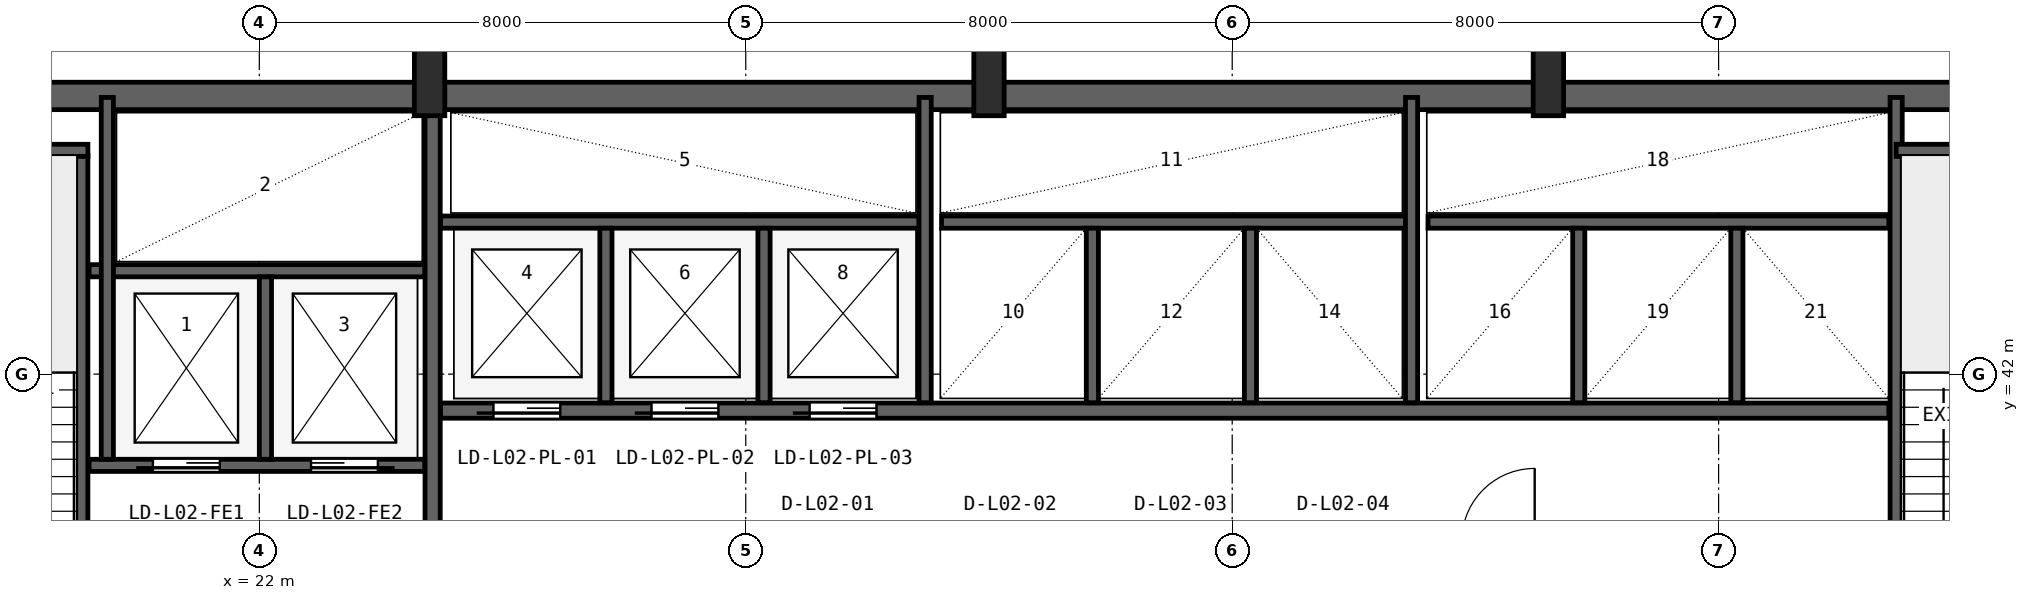
"""IFC4 building model, lengths in metres.
Left out: names, types, materials, properties, quantities, classifications, styles, units other than length and angle.
Written with IfcOpenShell. Run it as: python <this file> out.ifc"""

import sys

from ifc_helpers import new_model, si_unit, direction, frame, frame_2d, origin, origin_2d, place, context, subcontext, project, spatial, rectangle, i_section, extrude, source, transform, mapped, element, fill, save


model = new_model("IFC4")
c1 = context("Model", 3, precision=1e-05, world=origin(), true_north=direction((0.0, 1.0)))
c2 = subcontext(c1, "Body", "Model", "MODEL_VIEW")
j1 = project(units=[si_unit("LENGTHUNIT", "METRE"), si_unit("PLANEANGLEUNIT", "RADIAN")], contexts=[c1])
p1 = place(None, origin())
s1 = spatial("IfcSite", under=j1, at=p1, CompositionType="ELEMENT")
p2 = place(p1, origin())
s2 = spatial("IfcBuilding", under=s1, at=p2, CompositionType="ELEMENT")
p3 = place(p2, frame((0.0, 0.0, 11.4)))
s3 = spatial("IfcBuildingStorey", under=s2, at=p3, CompositionType="ELEMENT", Elevation=11.4)
p4 = place(p3, frame((15.6, 46.575, 0.0), z_axis=(0.0, 0.0, 1.0), x_axis=(1.0, 0.0, 0.0)))
e1 = element("IfcWall", 1, at=p4, inside=s3, PredefinedType="SHEAR", context=c2, shape_type="SweptSolid", body=[
    extrude(rectangle(XDim=36.8, YDim=0.45, at=frame_2d((18.4, 0.0))), origin(), (0.0, 0.0, 1.0), 5.12),
])
m1 = source(origin(), c2, "Body", "SweptSolid", [
    extrude(i_section(OverallWidth=0.5, OverallDepth=1.1, WebThickness=0.018, FlangeThickness=0.032, FilletRadius=0.018, at=origin_2d()), origin(), (0.0, 0.0, 1.0), 5.4),
])
for number, where, z_axis, x_axis in (
    (2, (24.8, 46.8, 0.0), (0.0, 0.0, 1.0), (1.0, 0.0, 0.0)),
    (3, (34.0, 46.8, 0.0), (0.0, 0.0, 1.0), (1.0, 0.0, 0.0)),
    (4, (43.2, 46.8, 0.0), (0.0, 0.0, 1.0), (1.0, 0.0, 0.0)),
):
    element("IfcColumn", number, at=place(p3, frame(where, z_axis=z_axis, x_axis=x_axis)), inside=s3, PredefinedType="COLUMN", context=c2, shape_type="MappedRepresentation", body=[
        mapped(m1, transform((0.0, 0.0, 0.0), x_axis=(1.0, 0.0, 0.0), y_axis=(0.0, 1.0, 0.0), z_axis=(0.0, 0.0, 1.0), scale=1.0)),
    ])
p5 = place(p3, frame((19.08, 35.95, 0.0), z_axis=(0.0, 0.0, 1.0), x_axis=(0.0, 1.0, 0.0)))
e5 = element("IfcWall", 5, at=p5, inside=s3, PredefinedType="SHEAR", context=c2, shape_type="SweptSolid", body=[
    extrude(rectangle(XDim=9.65, YDim=0.2, at=frame_2d((4.825, 0.0))), origin(), (0.0, 0.0, 1.0), 5.12),
])
p6 = place(p5, frame((0.25, 0.0, 0.0)))
e6 = element("IfcOpeningElement", 6, at=p6, cuts=e5, PredefinedType="OPENING", context=c2, shape_type="SweptSolid", body=[
    extrude(rectangle(XDim=0.95, YDim=2.1, at=frame_2d((0.475, 1.05))), frame((0.0, 0.11, 0.0), z_axis=(0.0, -1.0, 0.0), x_axis=(1.0, 0.0, 0.0)), (0.0, 0.0, 1.0), 0.22),
])
p7 = place(p3, frame((15.95, 45.68, 0.0), z_axis=(0.0, 0.0, 1.0), x_axis=(1.0, 0.0, 0.0)))
e7 = element("IfcWall", 7, at=p7, inside=s3, PredefinedType="SHEAR", context=c2, shape_type="SweptSolid", body=[
    extrude(rectangle(XDim=3.23, YDim=0.2, at=frame_2d((1.615, 0.0))), origin(), (0.0, 0.0, 1.0), 5.12),
])
p8 = place(p3, frame((24.85, 36.05, 0.0), z_axis=(0.0, 0.0, 1.0), x_axis=(0.0, 1.0, 0.0)))
e8 = element("IfcWall", 8, at=p8, inside=s3, PredefinedType="SHEAR", context=c2, shape_type="SweptSolid", body=[
    extrude(rectangle(XDim=10.45, YDim=0.25, at=frame_2d((5.225, 0.0))), origin(), (0.0, 0.0, 1.0), 5.12),
])
p9 = place(p3, frame((19.2, 40.5, 0.0), z_axis=(0.0, 0.0, 1.0), x_axis=(1.0, 0.0, 0.0)))
e9 = element("IfcWall", 9, at=p9, inside=s3, PredefinedType="SHEAR", context=c2, shape_type="SweptSolid", body=[
    extrude(rectangle(XDim=5.52, YDim=0.2, at=frame_2d((2.76, 0.0))), origin(), (0.0, 0.0, 1.0), 5.12),
])
p10 = place(p9, frame((1.05, 0.0, 0.0)))
e10 = element("IfcOpeningElement", 10, at=p10, cuts=e9, PredefinedType="OPENING", context=c2, shape_type="SweptSolid", body=[
    extrude(rectangle(XDim=1.1, YDim=2.18, at=frame_2d((0.55, 1.09))), frame((0.0, 0.11, 0.0), z_axis=(0.0, -1.0, 0.0), x_axis=(1.0, 0.0, 0.0)), (0.0, 0.0, 1.0), 0.22),
])
p11 = place(p9, frame((3.65, 0.0, 0.0)))
e11 = element("IfcOpeningElement", 11, at=p11, cuts=e9, PredefinedType="OPENING", context=c2, shape_type="SweptSolid", body=[
    extrude(rectangle(XDim=1.1, YDim=2.18, at=frame_2d((0.55, 1.09))), frame((0.0, 0.11, 0.0), z_axis=(0.0, -1.0, 0.0), x_axis=(1.0, 0.0, 0.0)), (0.0, 0.0, 1.0), 0.22),
])
p12 = place(p3, frame((19.2, 43.7, 0.0), z_axis=(0.0, 0.0, 1.0), x_axis=(1.0, 0.0, 0.0)))
e12 = element("IfcWall", 12, at=p12, inside=s3, PredefinedType="SHEAR", context=c2, shape_type="SweptSolid", body=[
    extrude(rectangle(XDim=5.52, YDim=0.2, at=frame_2d((2.76, 0.0))), origin(), (0.0, 0.0, 1.0), 5.12),
])
p13 = place(p3, frame((22.1, 40.6, 0.0), z_axis=(0.0, 0.0, 1.0), x_axis=(0.0, 1.0, 0.0)))
e13 = element("IfcWall", 13, at=p13, inside=s3, PredefinedType="SHEAR", context=c2, shape_type="SweptSolid", body=[
    extrude(rectangle(XDim=3.0, YDim=0.2, at=frame_2d((1.5, 0.0))), origin(), (0.0, 0.0, 1.0), 5.12),
])
p14 = place(p3, frame((19.5, 40.6, 0.0), z_axis=(0.0, 0.0, 1.0), x_axis=(0.0, 1.0, 0.0)))
e14 = element("IfcWall", 14, at=p14, inside=s3, PredefinedType="SHEAR", context=c2, shape_type="SweptSolid", body=[
    extrude(rectangle(XDim=5.95, YDim=0.2, at=frame_2d((2.975, 0.0))), origin(), (0.0, 0.0, 1.0), 5.12),
])
p15 = place(p3, frame((48.92, 36.05, 0.0), z_axis=(0.0, 0.0, 1.0), x_axis=(0.0, 1.0, 0.0)))
e15 = element("IfcWall", 15, at=p15, inside=s3, PredefinedType="SHEAR", context=c2, shape_type="SweptSolid", body=[
    extrude(rectangle(XDim=10.5, YDim=0.2, at=frame_2d((5.25, 0.0))), origin(), (0.0, 0.0, 1.0), 5.12),
])
p16 = place(p3, frame((48.92, 45.68, 0.0), z_axis=(0.0, 0.0, 1.0), x_axis=(1.0, 0.0, 0.0)))
e16 = element("IfcWall", 16, at=p16, inside=s3, PredefinedType="SHEAR", context=c2, shape_type="SweptSolid", body=[
    extrude(rectangle(XDim=3.18, YDim=0.2, at=frame_2d((1.59, 0.0))), origin(), (0.0, 0.0, 1.0), 5.12),
])
p17 = place(p3, frame((24.98, 41.4, 0.0), z_axis=(0.0, 0.0, 1.0), x_axis=(1.0, 0.0, 0.0)))
e17 = element("IfcWall", 17, at=p17, inside=s3, PredefinedType="SHEAR", context=c2, shape_type="SweptSolid", body=[
    extrude(rectangle(XDim=23.82, YDim=0.25, at=frame_2d((11.91, 0.0))), origin(), (0.0, 0.0, 1.0), 5.12),
])
p18 = place(p17, frame((0.87, 0.0, 0.0)))
e18 = element("IfcOpeningElement", 18, at=p18, cuts=e17, PredefinedType="OPENING", context=c2, shape_type="SweptSolid", body=[
    extrude(rectangle(XDim=1.1, YDim=2.18, at=frame_2d((0.55, 1.09))), frame((0.0, 0.135, 0.0), z_axis=(0.0, -1.0, 0.0), x_axis=(1.0, 0.0, 0.0)), (0.0, 0.0, 1.0), 0.27),
])
p19 = place(p17, frame((3.47, 0.0, 0.0)))
e19 = element("IfcOpeningElement", 19, at=p19, cuts=e17, PredefinedType="OPENING", context=c2, shape_type="SweptSolid", body=[
    extrude(rectangle(XDim=1.1, YDim=2.18, at=frame_2d((0.55, 1.09))), frame((0.0, 0.135, 0.0), z_axis=(0.0, -1.0, 0.0), x_axis=(1.0, 0.0, 0.0)), (0.0, 0.0, 1.0), 0.27),
])
p20 = place(p17, frame((6.07, 0.0, 0.0)))
e20 = element("IfcOpeningElement", 20, at=p20, cuts=e17, PredefinedType="OPENING", context=c2, shape_type="SweptSolid", body=[
    extrude(rectangle(XDim=1.1, YDim=2.18, at=frame_2d((0.55, 1.09))), frame((0.0, 0.135, 0.0), z_axis=(0.0, -1.0, 0.0), x_axis=(1.0, 0.0, 0.0)), (0.0, 0.0, 1.0), 0.27),
])
p21 = place(p3, frame((24.98, 44.5, 0.0), z_axis=(0.0, 0.0, 1.0), x_axis=(1.0, 0.0, 0.0)))
e21 = element("IfcWall", 21, at=p21, inside=s3, PredefinedType="SHEAR", context=c2, shape_type="SweptSolid", body=[
    extrude(rectangle(XDim=7.87, YDim=0.2, at=frame_2d((3.935, 0.0))), origin(), (0.0, 0.0, 1.0), 5.12),
])
for number, where, z_axis, x_axis in (
    (22, (27.7, 41.53, 0.0), (0.0, 0.0, 1.0), (0.0, 1.0, 0.0)),
    (23, (30.3, 41.53, 0.0), (0.0, 0.0, 1.0), (0.0, 1.0, 0.0)),
):
    element("IfcWall", number, at=place(p3, frame(where, z_axis=z_axis, x_axis=x_axis)), inside=s3, PredefinedType="SHEAR", context=c2, shape_type="SweptSolid", body=[
        extrude(rectangle(XDim=2.87, YDim=0.2, at=frame_2d((1.435, 0.0))), origin(), (0.0, 0.0, 1.0), 5.12),
    ])
p22 = place(p3, frame((32.95, 41.53, 0.0), z_axis=(0.0, 0.0, 1.0), x_axis=(0.0, 1.0, 0.0)))
e24 = element("IfcWall", 24, at=p22, inside=s3, PredefinedType="SHEAR", context=c2, shape_type="SweptSolid", body=[
    extrude(rectangle(XDim=5.02, YDim=0.2, at=frame_2d((2.51, 0.0))), origin(), (0.0, 0.0, 1.0), 5.12),
])
p23 = place(p3, frame((33.22, 44.5, 0.0), z_axis=(0.0, 0.0, 1.0), x_axis=(1.0, 0.0, 0.0)))
e25 = element("IfcWall", 25, at=p23, inside=s3, PredefinedType="SHEAR", context=c2, shape_type="SweptSolid", body=[
    extrude(rectangle(XDim=7.63, YDim=0.2, at=frame_2d((3.815, 0.0))), origin(), (0.0, 0.0, 1.0), 5.12),
])
for number, where, z_axis, x_axis in (
    (26, (35.7, 41.53, 0.0), (0.0, 0.0, 1.0), (0.0, 1.0, 0.0)),
    (27, (38.3, 41.53, 0.0), (0.0, 0.0, 1.0), (0.0, 1.0, 0.0)),
):
    element("IfcWall", number, at=place(p3, frame(where, z_axis=z_axis, x_axis=x_axis)), inside=s3, PredefinedType="SHEAR", context=c2, shape_type="SweptSolid", body=[
        extrude(rectangle(XDim=2.87, YDim=0.2, at=frame_2d((1.435, 0.0))), origin(), (0.0, 0.0, 1.0), 5.12),
    ])
p24 = place(p3, frame((40.95, 41.53, 0.0), z_axis=(0.0, 0.0, 1.0), x_axis=(0.0, 1.0, 0.0)))
e28 = element("IfcWall", 28, at=p24, inside=s3, PredefinedType="SHEAR", context=c2, shape_type="SweptSolid", body=[
    extrude(rectangle(XDim=5.02, YDim=0.2, at=frame_2d((2.51, 0.0))), origin(), (0.0, 0.0, 1.0), 5.12),
])
p25 = place(p3, frame((41.22, 44.5, 0.0), z_axis=(0.0, 0.0, 1.0), x_axis=(1.0, 0.0, 0.0)))
e29 = element("IfcWall", 29, at=p25, inside=s3, PredefinedType="SHEAR", context=c2, shape_type="SweptSolid", body=[
    extrude(rectangle(XDim=7.58, YDim=0.2, at=frame_2d((3.79, 0.0))), origin(), (0.0, 0.0, 1.0), 5.12),
])
for number, where, z_axis, x_axis in (
    (30, (43.7, 41.53, 0.0), (0.0, 0.0, 1.0), (0.0, 1.0, 0.0)),
    (31, (46.3, 41.53, 0.0), (0.0, 0.0, 1.0), (0.0, 1.0, 0.0)),
):
    element("IfcWall", number, at=place(p3, frame(where, z_axis=z_axis, x_axis=x_axis)), inside=s3, PredefinedType="SHEAR", context=c2, shape_type="SweptSolid", body=[
        extrude(rectangle(XDim=2.87, YDim=0.2, at=frame_2d((1.435, 0.0))), origin(), (0.0, 0.0, 1.0), 5.12),
    ])
m2 = source(origin(), c2, "Body", "SweptSolid", [
    extrude(rectangle(XDim=1.1, YDim=2.18, at=frame_2d((0.55, 1.09))), frame((0.0, 0.025, 0.0), z_axis=(0.0, -1.0, 0.0), x_axis=(1.0, 0.0, 0.0)), (0.0, 0.0, 1.0), 0.05),
])
p26 = place(p10, frame((1.1, 0.0, 0.0), z_axis=(0.0, 0.0, 1.0), x_axis=(-1.0, 0.0, 0.0)))
e32 = element("IfcDoor", 32, at=p26, inside=s3, OperationType="SLIDING_TO_LEFT", PredefinedType="DOOR", context=c2, shape_type="MappedRepresentation", body=[
    mapped(m2, transform((0.0, 0.0, 0.0), x_axis=(1.0, 0.0, 0.0), y_axis=(0.0, 1.0, 0.0), z_axis=(0.0, 0.0, 1.0), scale=1.0)),
])
fill(e10, e32)
p27 = place(p11, frame((1.1, 0.0, 0.0), z_axis=(0.0, 0.0, 1.0), x_axis=(-1.0, 0.0, 0.0)))
e33 = element("IfcDoor", 33, at=p27, inside=s3, OperationType="SLIDING_TO_RIGHT", PredefinedType="DOOR", context=c2, shape_type="MappedRepresentation", body=[
    mapped(m2, transform((0.0, 0.0, 0.0), x_axis=(1.0, 0.0, 0.0), y_axis=(0.0, 1.0, 0.0), z_axis=(0.0, 0.0, 1.0), scale=1.0)),
])
fill(e11, e33)
p28 = place(p18, frame((1.1, 0.0, 0.0), z_axis=(0.0, 0.0, 1.0), x_axis=(-1.0, 0.0, 0.0)))
e34 = element("IfcDoor", 34, at=p28, inside=s3, OperationType="SLIDING_TO_LEFT", PredefinedType="DOOR", context=c2, shape_type="MappedRepresentation", body=[
    mapped(m2, transform((0.0, 0.0, 0.0), x_axis=(1.0, 0.0, 0.0), y_axis=(0.0, 1.0, 0.0), z_axis=(0.0, 0.0, 1.0), scale=1.0)),
])
fill(e18, e34)
p29 = place(p19, frame((1.1, 0.0, 0.0), z_axis=(0.0, 0.0, 1.0), x_axis=(-1.0, 0.0, 0.0)))
e35 = element("IfcDoor", 35, at=p29, inside=s3, OperationType="SLIDING_TO_LEFT", PredefinedType="DOOR", context=c2, shape_type="MappedRepresentation", body=[
    mapped(m2, transform((0.0, 0.0, 0.0), x_axis=(1.0, 0.0, 0.0), y_axis=(0.0, 1.0, 0.0), z_axis=(0.0, 0.0, 1.0), scale=1.0)),
])
fill(e19, e35)
p30 = place(p20, frame((1.1, 0.0, 0.0), z_axis=(0.0, 0.0, 1.0), x_axis=(-1.0, 0.0, 0.0)))
e36 = element("IfcDoor", 36, at=p30, inside=s3, OperationType="SLIDING_TO_LEFT", PredefinedType="DOOR", context=c2, shape_type="MappedRepresentation", body=[
    mapped(m2, transform((0.0, 0.0, 0.0), x_axis=(1.0, 0.0, 0.0), y_axis=(0.0, 1.0, 0.0), z_axis=(0.0, 0.0, 1.0), scale=1.0)),
])
fill(e20, e36)
save(model, sys.argv[1])
